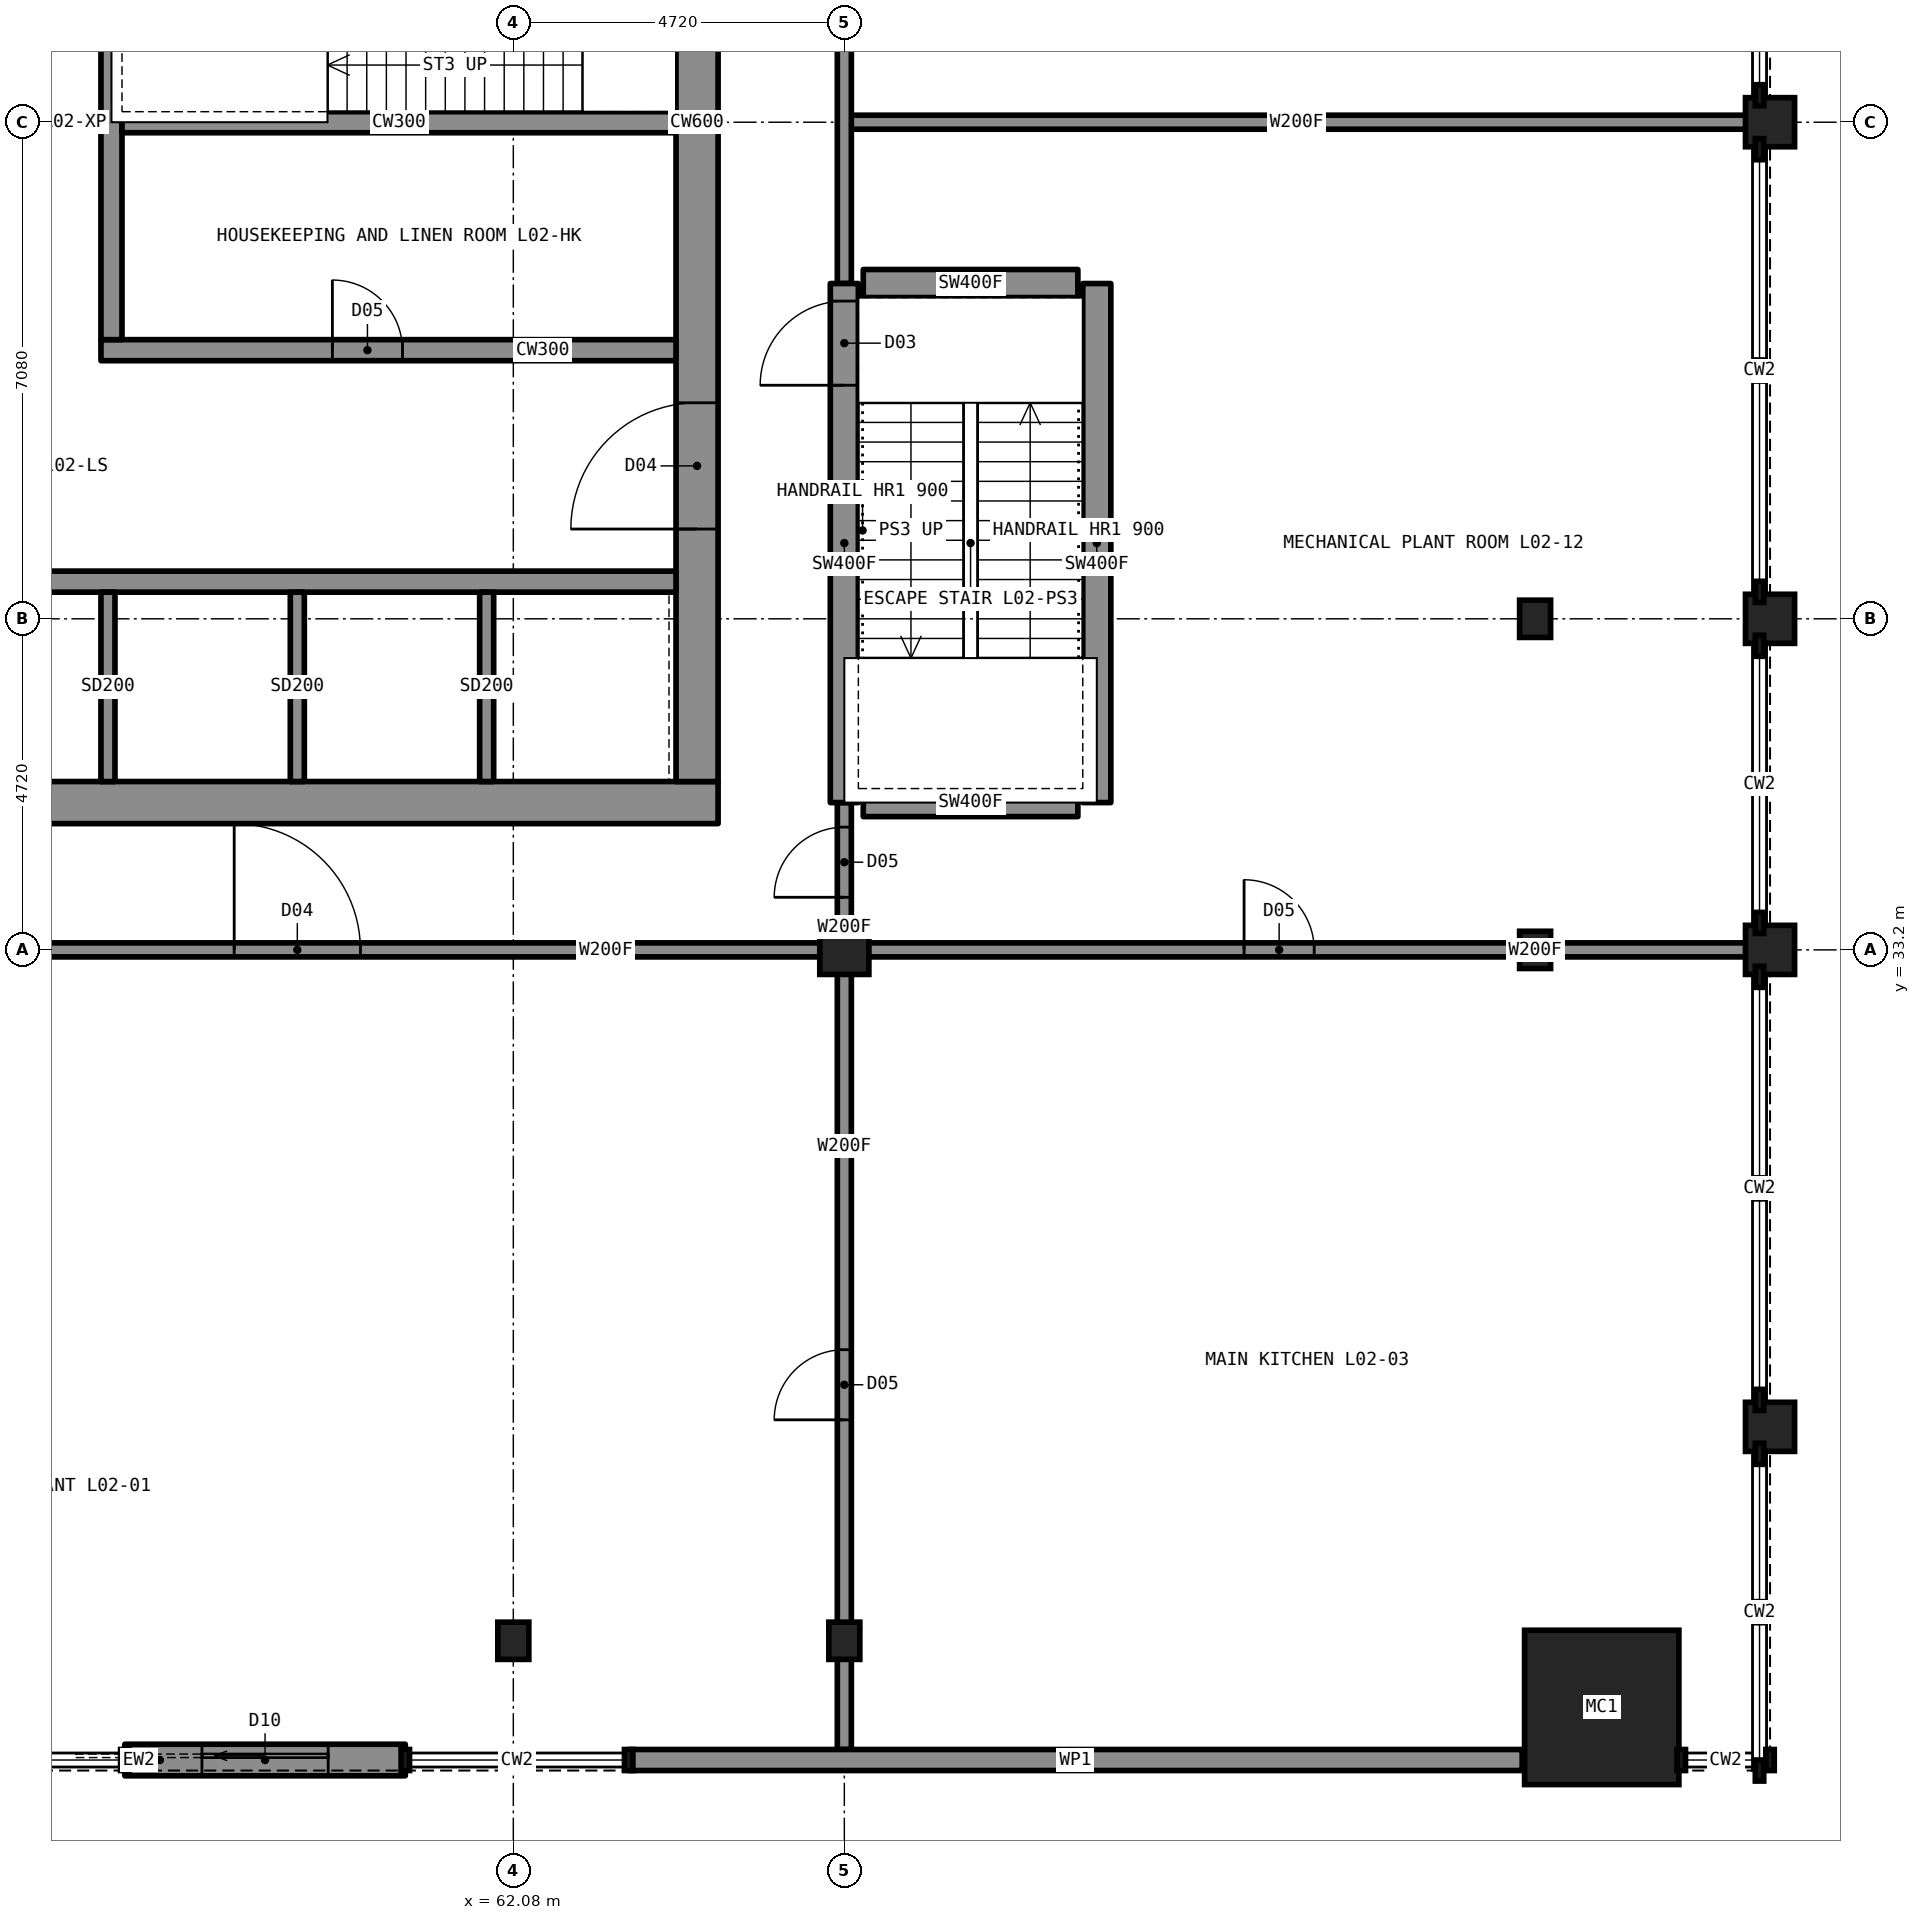
"""IFC4 building model, lengths in metres.
Left out: names, types, materials, properties, quantities, classifications, styles, units other than length and angle.
Written with IfcOpenShell. Run it as: python <this file> out.ifc"""

import sys

from ifc_helpers import new_model, si_unit, direction, frame, frame_2d, origin, origin_2d, place, context, subcontext, project, spatial, rectangle, hollow_rectangle, i_section, extrude, element, fill, save


model = new_model("IFC4")
c1 = context("Model", 3, precision=1e-05, world=origin(), true_north=direction((0.0, 1.0)))
c2 = subcontext(c1, "Body", "Model", "MODEL_VIEW")
j1 = project(units=[si_unit("LENGTHUNIT", "METRE"), si_unit("PLANEANGLEUNIT", "RADIAN")], contexts=[c1])
p1 = place(None, origin())
s1 = spatial("IfcSite", under=j1, at=p1, CompositionType="ELEMENT")
p2 = place(p1, origin())
s2 = spatial("IfcBuilding", under=s1, at=p2, CompositionType="ELEMENT")
p3 = place(p2, frame((0.0, 0.0, 11.0)))
s3 = spatial("IfcBuildingStorey", under=s2, at=p3, CompositionType="ELEMENT", Elevation=11.0)
for number, where, z_axis, x_axis in (
    (1, (62.08, 23.35, 0.0), (0.0, 0.0, 1.0), (1.0, 0.0, 0.0)),
    (2, (66.8, 23.35, 0.0), (0.0, 0.0, 1.0), (1.0, 0.0, 0.0)),
    (3, (76.65, 33.2, 0.0), (0.0, 0.0, 1.0), (1.0, 0.0, 0.0)),
    (4, (76.65, 37.92, 0.0), (0.0, 0.0, 1.0), (1.0, 0.0, 0.0)),
):
    element("IfcColumn", number, at=place(p3, frame(where, z_axis=z_axis, x_axis=x_axis)), inside=s3, PredefinedType="COLUMN", context=c2, shape_type="SweptSolid", body=[
        extrude(i_section(OverallWidth=0.442, OverallDepth=0.531, WebThickness=0.066, FlangeThickness=0.106, at=origin_2d()), origin(), (0.0, 0.0, 1.0), 5.0),
    ])
p4 = place(p3, frame((66.8, 33.2, 0.0), z_axis=(0.0, 0.0, 1.0), x_axis=(1.0, 0.0, 0.0)))
e5 = element("IfcColumn", 5, at=p4, inside=s3, PredefinedType="COLUMN", context=c2, shape_type="SweptSolid", body=[
    extrude(hollow_rectangle(XDim=0.7, YDim=0.7, WallThickness=0.06, at=origin_2d()), origin(), (0.0, 0.0, 1.0), 5.0),
])
p5 = place(p3, frame((77.6, 22.4, 0.0), z_axis=(0.0, 0.0, 1.0), x_axis=(1.0, 0.0, 0.0)))
e6 = element("IfcColumn", 6, at=p5, inside=s3, PredefinedType="COLUMN", context=c2, shape_type="SweptSolid", body=[
    extrude(hollow_rectangle(XDim=2.2, YDim=2.2, WallThickness=0.15, at=origin_2d()), origin(), (0.0, 0.0, 1.0), 5.0),
])
for number, where, z_axis, x_axis in (
    (7, (80.0, 26.4, 0.0), (0.0, 0.0, 1.0), (1.0, 0.0, 0.0)),
    (8, (80.0, 33.2, 0.0), (0.0, 0.0, 1.0), (1.0, 0.0, 0.0)),
    (9, (80.0, 37.92, 0.0), (0.0, 0.0, 1.0), (1.0, 0.0, 0.0)),
    (10, (80.0, 45.0, 0.0), (0.0, 0.0, 1.0), (1.0, 0.0, 0.0)),
):
    element("IfcColumn", number, at=place(p3, frame(where, z_axis=z_axis, x_axis=x_axis)), inside=s3, PredefinedType="COLUMN", context=c2, shape_type="SweptSolid", body=[
        extrude(rectangle(XDim=0.7, YDim=0.7, at=origin_2d()), origin(), (0.0, 0.0, 1.0), 5.0),
    ])
p6 = place(p3, frame((45.0, 35.3, 0.0), z_axis=(0.0, 0.0, 1.0), x_axis=(1.0, 0.0, 0.0)))
e11 = element("IfcWall", 11, at=p6, inside=s3, PredefinedType="SHEAR", context=c2, shape_type="SweptSolid", body=[
    extrude(rectangle(XDim=20.0, YDim=0.6, at=frame_2d((10.0, 0.0))), origin(), (0.0, 0.0, 1.0), 5.0),
])
p7 = place(p3, frame((64.7, 35.6, 0.0), z_axis=(0.0, 0.0, 1.0), x_axis=(0.0, 1.0, 0.0)))
e12 = element("IfcWall", 12, at=p7, inside=s3, PredefinedType="SHEAR", context=c2, shape_type="SweptSolid", body=[
    extrude(rectangle(XDim=18.8, YDim=0.6, at=frame_2d((9.4, 0.0))), origin(), (0.0, 0.0, 1.0), 5.0),
])
p8 = place(p7, frame((13.4, 0.0, 0.0)))
e13 = element("IfcOpeningElement", 13, at=p8, cuts=e12, PredefinedType="OPENING", context=c2, shape_type="SweptSolid", body=[
    extrude(rectangle(XDim=1.8, YDim=2.2, at=frame_2d((0.9, 1.1))), frame((0.0, 0.31, 0.0), z_axis=(0.0, -1.0, 0.0), x_axis=(1.0, 0.0, 0.0)), (0.0, 0.0, 1.0), 0.62),
])
p9 = place(p7, frame((3.6, 0.0, 0.0)))
e14 = element("IfcOpeningElement", 14, at=p9, cuts=e12, PredefinedType="OPENING", context=c2, shape_type="SweptSolid", body=[
    extrude(rectangle(XDim=1.8, YDim=2.2, at=frame_2d((0.9, 1.1))), frame((0.0, 0.31, 0.0), z_axis=(0.0, -1.0, 0.0), x_axis=(1.0, 0.0, 0.0)), (0.0, 0.0, 1.0), 0.62),
])
p10 = place(p3, frame((45.6, 38.45, 0.0), z_axis=(0.0, 0.0, 1.0), x_axis=(1.0, 0.0, 0.0)))
e15 = element("IfcWall", 15, at=p10, inside=s3, PredefinedType="SHEAR", context=c2, shape_type="SweptSolid", body=[
    extrude(rectangle(XDim=18.8, YDim=0.3, at=frame_2d((9.4, 0.0))), origin(), (0.0, 0.0, 1.0), 5.0),
])
p11 = place(p3, frame((56.2, 41.75, 0.0), z_axis=(0.0, 0.0, 1.0), x_axis=(1.0, 0.0, 0.0)))
e16 = element("IfcWall", 16, at=p11, inside=s3, PredefinedType="SHEAR", context=c2, shape_type="SweptSolid", body=[
    extrude(rectangle(XDim=8.2, YDim=0.3, at=frame_2d((4.1, 0.0))), origin(), (0.0, 0.0, 1.0), 5.0),
])
p12 = place(p11, frame((3.3, 0.0, 0.0)))
e17 = element("IfcOpeningElement", 17, at=p12, cuts=e16, PredefinedType="OPENING", context=c2, shape_type="SweptSolid", body=[
    extrude(rectangle(XDim=1.0, YDim=2.1, at=frame_2d((0.5, 1.05))), frame((0.0, 0.16, 0.0), z_axis=(0.0, -1.0, 0.0), x_axis=(1.0, 0.0, 0.0)), (0.0, 0.0, 1.0), 0.32),
])
p13 = place(p3, frame((56.35, 41.9, 0.0), z_axis=(0.0, 0.0, 1.0), x_axis=(0.0, 1.0, 0.0)))
e18 = element("IfcWall", 18, at=p13, inside=s3, PredefinedType="SHEAR", context=c2, shape_type="SweptSolid", body=[
    extrude(rectangle(XDim=9.5, YDim=0.3, at=frame_2d((4.75, 0.0))), origin(), (0.0, 0.0, 1.0), 5.0),
])
p14 = place(p13, frame((7.1, 0.0, 0.0)))
e19 = element("IfcOpeningElement", 19, at=p14, cuts=e18, PredefinedType="OPENING", context=c2, shape_type="SweptSolid", body=[
    extrude(rectangle(XDim=1.8, YDim=2.2, at=frame_2d((0.9, 1.1))), frame((0.0, 0.16, 0.0), z_axis=(0.0, -1.0, 0.0), x_axis=(1.0, 0.0, 0.0)), (0.0, 0.0, 1.0), 0.32),
])
p15 = place(p3, frame((56.5, 45.0, 0.0), z_axis=(0.0, 0.0, 1.0), x_axis=(1.0, 0.0, 0.0)))
e20 = element("IfcWall", 20, at=p15, inside=s3, PredefinedType="SHEAR", context=c2, shape_type="SweptSolid", body=[
    extrude(rectangle(XDim=7.9, YDim=0.3, at=frame_2d((3.95, 0.0))), origin(), (0.0, 0.0, 1.0), 5.0),
])
p16 = place(p3, frame((52.7, 33.2, 0.0), z_axis=(0.0, 0.0, 1.0), x_axis=(1.0, 0.0, 0.0)))
e21 = element("IfcWall", 21, at=p16, inside=s3, PredefinedType="PARTITIONING", context=c2, shape_type="SweptSolid", body=[
    extrude(rectangle(XDim=14.1, YDim=0.2, at=frame_2d((7.05, 0.0))), origin(), (0.0, 0.0, 1.0), 4.65),
])
p17 = place(p16, frame((5.4, 0.0, 0.0)))
e22 = element("IfcOpeningElement", 22, at=p17, cuts=e21, PredefinedType="OPENING", context=c2, shape_type="SweptSolid", body=[
    extrude(rectangle(XDim=1.8, YDim=2.2, at=frame_2d((0.9, 1.1))), frame((0.0, 0.11, 0.0), z_axis=(0.0, -1.0, 0.0), x_axis=(1.0, 0.0, 0.0)), (0.0, 0.0, 1.0), 0.22),
])
p18 = place(p3, frame((66.8, 33.2, 0.0), z_axis=(0.0, 0.0, 1.0), x_axis=(1.0, 0.0, 0.0)))
e23 = element("IfcWall", 23, at=p18, inside=s3, PredefinedType="PARTITIONING", context=c2, shape_type="SweptSolid", body=[
    extrude(rectangle(XDim=12.9, YDim=0.2, at=frame_2d((6.45, 0.0))), origin(), (0.0, 0.0, 1.0), 4.65),
])
p19 = place(p18, frame((5.7, 0.0, 0.0)))
e24 = element("IfcOpeningElement", 24, at=p19, cuts=e23, PredefinedType="OPENING", context=c2, shape_type="SweptSolid", body=[
    extrude(rectangle(XDim=1.0, YDim=2.1, at=frame_2d((0.5, 1.05))), frame((0.0, 0.11, 0.0), z_axis=(0.0, -1.0, 0.0), x_axis=(1.0, 0.0, 0.0)), (0.0, 0.0, 1.0), 0.22),
])
for number, where, z_axis, x_axis in (
    (25, (67.07, 42.7, 0.0), (0.0, 0.0, 1.0), (1.0, 0.0, 0.0)),
    (26, (67.07, 35.3, 0.0), (0.0, 0.0, 1.0), (1.0, 0.0, 0.0)),
):
    element("IfcWall", number, at=place(p3, frame(where, z_axis=z_axis, x_axis=x_axis)), inside=s3, PredefinedType="SHEAR", context=c2, shape_type="SweptSolid", body=[
        extrude(rectangle(XDim=3.06, YDim=0.4, at=frame_2d((1.53, 0.0))), origin(), (0.0, 0.0, 1.0), 5.0),
    ])
p20 = place(p3, frame((66.8, 45.0, 0.0), z_axis=(0.0, 0.0, 1.0), x_axis=(1.0, 0.0, 0.0)))
e27 = element("IfcWall", 27, at=p20, inside=s3, PredefinedType="PARTITIONING", context=c2, shape_type="SweptSolid", body=[
    extrude(rectangle(XDim=12.9, YDim=0.2, at=frame_2d((6.45, 0.0))), origin(), (0.0, 0.0, 1.0), 4.65),
])
p21 = place(p3, frame((66.8, 33.2, 0.0), z_axis=(0.0, 0.0, 1.0), x_axis=(0.0, 1.0, 0.0)))
e28 = element("IfcWall", 28, at=p21, inside=s3, PredefinedType="PARTITIONING", context=c2, shape_type="SweptSolid", body=[
    extrude(rectangle(XDim=2.1, YDim=0.2, at=frame_2d((1.05, 0.0))), origin(), (0.0, 0.0, 1.0), 4.65),
])
p22 = place(p21, frame((0.75, 0.0, 0.0)))
e29 = element("IfcOpeningElement", 29, at=p22, cuts=e28, PredefinedType="OPENING", context=c2, shape_type="SweptSolid", body=[
    extrude(rectangle(XDim=1.0, YDim=2.1, at=frame_2d((0.5, 1.05))), frame((0.0, 0.11, 0.0), z_axis=(0.0, -1.0, 0.0), x_axis=(1.0, 0.0, 0.0)), (0.0, 0.0, 1.0), 0.22),
])
p23 = place(p3, frame((66.8, 42.7, 0.0), z_axis=(0.0, 0.0, 1.0), x_axis=(0.0, 1.0, 0.0)))
e30 = element("IfcWall", 30, at=p23, inside=s3, PredefinedType="PARTITIONING", context=c2, shape_type="SweptSolid", body=[
    extrude(rectangle(XDim=14.1, YDim=0.2, at=frame_2d((7.05, 0.0))), origin(), (0.0, 0.0, 1.0), 4.65),
])
p24 = place(p23, frame((8.8, 0.0, 0.0)))
e31 = element("IfcOpeningElement", 31, at=p24, cuts=e30, PredefinedType="OPENING", context=c2, shape_type="SweptSolid", body=[
    extrude(rectangle(XDim=1.0, YDim=2.1, at=frame_2d((0.5, 1.05))), frame((0.0, 0.11, 0.0), z_axis=(0.0, -1.0, 0.0), x_axis=(1.0, 0.0, 0.0)), (0.0, 0.0, 1.0), 0.22),
])
p25 = place(p3, frame((66.8, 21.8, 0.0), z_axis=(0.0, 0.0, 1.0), x_axis=(0.0, 1.0, 0.0)))
e32 = element("IfcWall", 32, at=p25, inside=s3, PredefinedType="PARTITIONING", context=c2, shape_type="SweptSolid", body=[
    extrude(rectangle(XDim=11.4, YDim=0.2, at=frame_2d((5.7, 0.0))), origin(), (0.0, 0.0, 1.0), 4.65),
])
p26 = place(p25, frame((4.7, 0.0, 0.0)))
e33 = element("IfcOpeningElement", 33, at=p26, cuts=e32, PredefinedType="OPENING", context=c2, shape_type="SweptSolid", body=[
    extrude(rectangle(XDim=1.0, YDim=2.1, at=frame_2d((0.5, 1.05))), frame((0.0, 0.11, 0.0), z_axis=(0.0, -1.0, 0.0), x_axis=(1.0, 0.0, 0.0)), (0.0, 0.0, 1.0), 0.22),
])
p27 = place(p3, frame((66.8, 35.3, 0.0), z_axis=(0.0, 0.0, 1.0), x_axis=(0.0, 1.0, 0.0)))
e34 = element("IfcWall", 34, at=p27, inside=s3, PredefinedType="SHEAR", context=c2, shape_type="SweptSolid", body=[
    extrude(rectangle(XDim=7.4, YDim=0.4, at=frame_2d((3.7, 0.0))), origin(), (0.0, 0.0, 1.0), 5.0),
])
p28 = place(p27, frame((5.95, 0.0, 0.0)))
e35 = element("IfcOpeningElement", 35, at=p28, cuts=e34, PredefinedType="OPENING", context=c2, shape_type="SweptSolid", body=[
    extrude(rectangle(XDim=1.2, YDim=2.2, at=frame_2d((0.6, 1.1))), frame((0.0, 0.21, 0.0), z_axis=(0.0, -1.0, 0.0), x_axis=(1.0, 0.0, 0.0)), (0.0, 0.0, 1.0), 0.42),
])
p29 = place(p3, frame((70.4, 35.3, 0.0), z_axis=(0.0, 0.0, 1.0), x_axis=(0.0, 1.0, 0.0)))
e36 = element("IfcWall", 36, at=p29, inside=s3, PredefinedType="SHEAR", context=c2, shape_type="SweptSolid", body=[
    extrude(rectangle(XDim=7.4, YDim=0.4, at=frame_2d((3.7, 0.0))), origin(), (0.0, 0.0, 1.0), 5.0),
])
p30 = place(p3, frame((56.54, 21.65, 0.0), z_axis=(0.0, 0.0, 1.0), x_axis=(1.0, 0.0, 0.0)))
e37 = element("IfcWall", 37, at=p30, inside=s3, PredefinedType="SOLIDWALL", context=c2, shape_type="SweptSolid", body=[
    extrude(rectangle(XDim=4.0, YDim=0.45, at=frame_2d((2.0, 0.0))), origin(), (0.0, 0.0, 1.0), 4.65),
])
p31 = place(p30, frame((1.1, 0.0, 0.0)))
e38 = element("IfcOpeningElement", 38, at=p31, cuts=e37, PredefinedType="OPENING", context=c2, shape_type="SweptSolid", body=[
    extrude(rectangle(XDim=1.8, YDim=2.4, at=frame_2d((0.9, 1.2))), frame((0.0, 0.235, 0.0), z_axis=(0.0, -1.0, 0.0), x_axis=(1.0, 0.0, 0.0)), (0.0, 0.0, 1.0), 0.47),
])
for number, where, z_axis, x_axis in (
    (39, (56.3, 35.6, 0.0), (0.0, 0.0, 1.0), (0.0, 1.0, 0.0)),
    (40, (59.0, 35.6, 0.0), (0.0, 0.0, 1.0), (0.0, 1.0, 0.0)),
    (41, (61.7, 35.6, 0.0), (0.0, 0.0, 1.0), (0.0, 1.0, 0.0)),
):
    element("IfcWall", number, at=place(p3, frame(where, z_axis=z_axis, x_axis=x_axis)), inside=s3, PredefinedType="PARTITIONING", context=c2, shape_type="SweptSolid", body=[
        extrude(rectangle(XDim=2.7, YDim=0.2, at=frame_2d((1.35, 0.0))), origin(), (0.0, 0.0, 1.0), 4.65),
    ])
p32 = place(p3, frame((63.725, 21.65, 0.0), z_axis=(0.0, 0.0, 1.0), x_axis=(1.0, 0.0, 0.0)))
e42 = element("IfcWall", 42, at=p32, inside=s3, PredefinedType="SOLIDWALL", context=c2, shape_type="SweptSolid", body=[
    extrude(rectangle(XDim=12.74, YDim=0.3, at=frame_2d((6.37, 0.0))), origin(), (0.0, 0.0, 1.0), 4.65),
])
p33 = place(p28, origin())
e43 = element("IfcDoor", 43, at=p33, inside=s3, OperationType="SINGLE_SWING_LEFT", PredefinedType="DOOR", context=c2, shape_type="SweptSolid", body=[
    extrude(rectangle(XDim=1.2, YDim=2.2, at=frame_2d((0.6, 1.1))), frame((0.0, 0.025, 0.0), z_axis=(0.0, -1.0, 0.0), x_axis=(1.0, 0.0, 0.0)), (0.0, 0.0, 1.0), 0.05),
])
fill(e35, e43)
p34 = place(p17, origin())
e44 = element("IfcDoor", 44, at=p34, inside=s3, OperationType="DOUBLE_DOOR_SINGLE_SWING", PredefinedType="DOOR", context=c2, shape_type="SweptSolid", body=[
    extrude(rectangle(XDim=1.8, YDim=2.2, at=frame_2d((0.9, 1.1))), frame((0.0, 0.025, 0.0), z_axis=(0.0, -1.0, 0.0), x_axis=(1.0, 0.0, 0.0)), (0.0, 0.0, 1.0), 0.05),
])
fill(e22, e44)
p35 = place(p26, origin())
e45 = element("IfcDoor", 45, at=p35, inside=s3, OperationType="SINGLE_SWING_LEFT", PredefinedType="DOOR", context=c2, shape_type="SweptSolid", body=[
    extrude(rectangle(XDim=1.0, YDim=2.1, at=frame_2d((0.5, 1.05))), frame((0.0, 0.025, 0.0), z_axis=(0.0, -1.0, 0.0), x_axis=(1.0, 0.0, 0.0)), (0.0, 0.0, 1.0), 0.05),
])
fill(e33, e45)
p36 = place(p19, origin())
e46 = element("IfcDoor", 46, at=p36, inside=s3, OperationType="SINGLE_SWING_LEFT", PredefinedType="DOOR", context=c2, shape_type="SweptSolid", body=[
    extrude(rectangle(XDim=1.0, YDim=2.1, at=frame_2d((0.5, 1.05))), frame((0.0, 0.025, 0.0), z_axis=(0.0, -1.0, 0.0), x_axis=(1.0, 0.0, 0.0)), (0.0, 0.0, 1.0), 0.05),
])
fill(e24, e46)
p37 = place(p22, origin())
e47 = element("IfcDoor", 47, at=p37, inside=s3, OperationType="SINGLE_SWING_LEFT", PredefinedType="DOOR", context=c2, shape_type="SweptSolid", body=[
    extrude(rectangle(XDim=1.0, YDim=2.1, at=frame_2d((0.5, 1.05))), frame((0.0, 0.025, 0.0), z_axis=(0.0, -1.0, 0.0), x_axis=(1.0, 0.0, 0.0)), (0.0, 0.0, 1.0), 0.05),
])
fill(e29, e47)
p38 = place(p31, origin())
e48 = element("IfcDoor", 48, at=p38, inside=s3, OperationType="SLIDING_TO_LEFT", PredefinedType="DOOR", context=c2, shape_type="SweptSolid", body=[
    extrude(rectangle(XDim=1.8, YDim=2.4, at=frame_2d((0.9, 1.2))), frame((0.0, 0.025, 0.0), z_axis=(0.0, -1.0, 0.0), x_axis=(1.0, 0.0, 0.0)), (0.0, 0.0, 1.0), 0.05),
])
fill(e38, e48)
p39 = place(p9, origin())
e49 = element("IfcDoor", 49, at=p39, inside=s3, OperationType="DOUBLE_DOOR_SINGLE_SWING", PredefinedType="DOOR", context=c2, shape_type="SweptSolid", body=[
    extrude(rectangle(XDim=1.8, YDim=2.2, at=frame_2d((0.9, 1.1))), frame((0.0, 0.025, 0.0), z_axis=(0.0, -1.0, 0.0), x_axis=(1.0, 0.0, 0.0)), (0.0, 0.0, 1.0), 0.05),
])
fill(e14, e49)
p40 = place(p12, origin())
e50 = element("IfcDoor", 50, at=p40, inside=s3, OperationType="SINGLE_SWING_LEFT", PredefinedType="DOOR", context=c2, shape_type="SweptSolid", body=[
    extrude(rectangle(XDim=1.0, YDim=2.1, at=frame_2d((0.5, 1.05))), frame((0.0, 0.025, 0.0), z_axis=(0.0, -1.0, 0.0), x_axis=(1.0, 0.0, 0.0)), (0.0, 0.0, 1.0), 0.05),
])
fill(e17, e50)
save(model, sys.argv[1])
